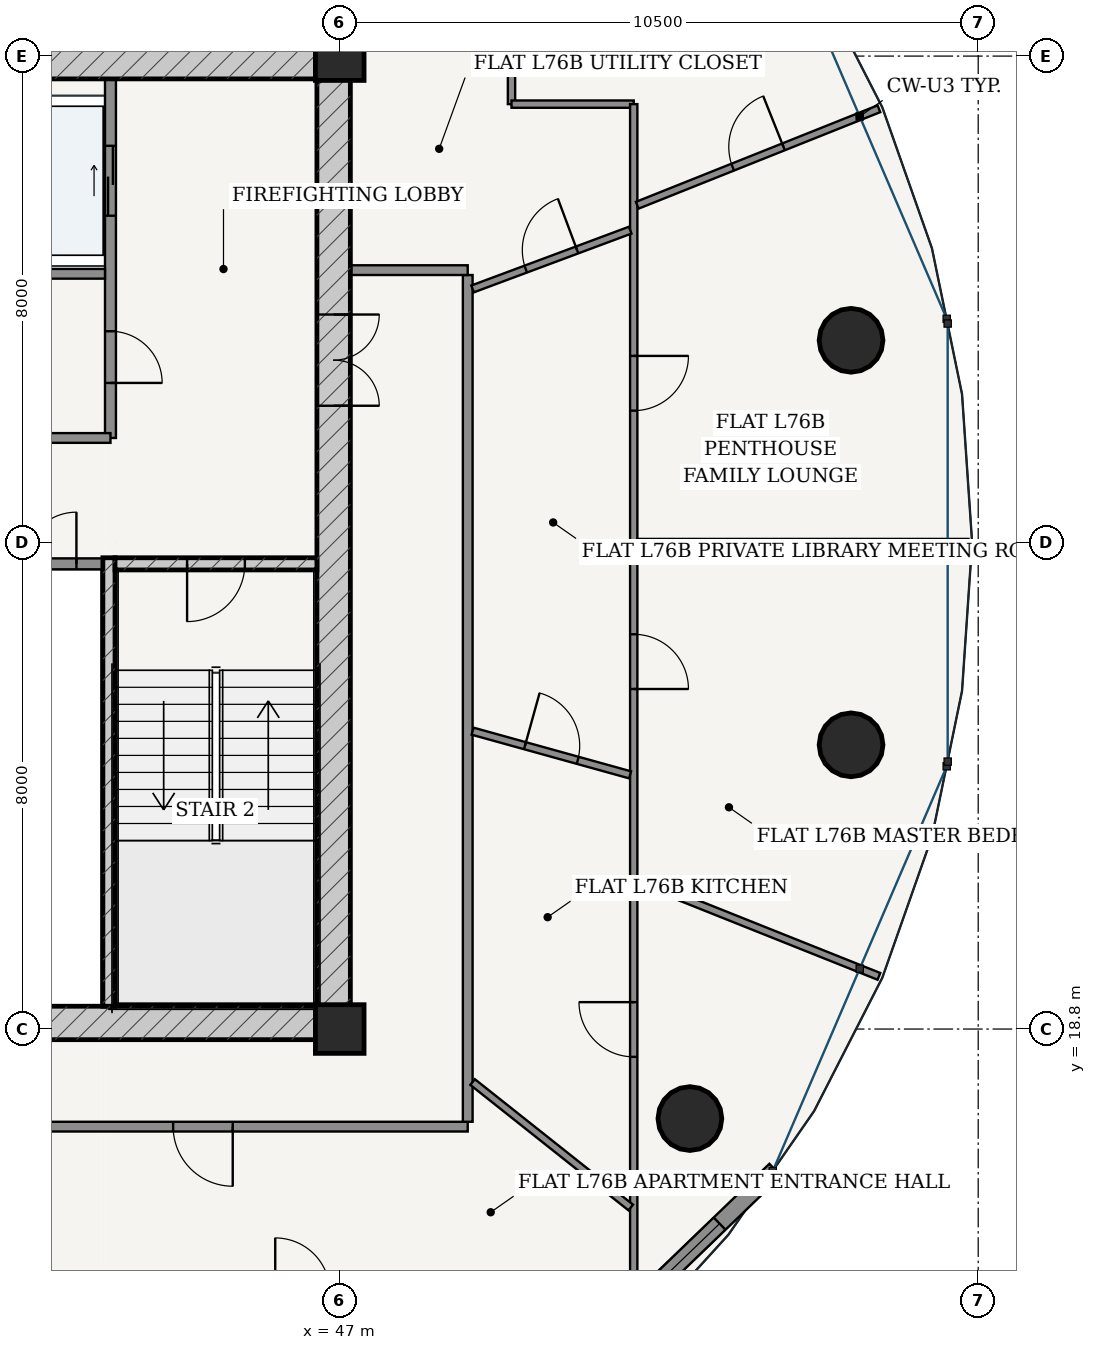
"""IFC4 building model, lengths in metres.
Left out: names, types, materials, properties, quantities, classifications, styles, units other than length and angle.
Written with IfcOpenShell. Run it as: python <this file> out.ifc"""

import sys

from ifc_helpers import new_model, si_unit, direction, frame, frame_2d, origin, origin_2d, place, context, subcontext, project, spatial, rectangle, hollow_circle, extrude, source, transform, mapped, element, fill, save


model = new_model("IFC4")
c1 = context("Model", 3, precision=1e-05, world=origin(), true_north=direction((-0.2419218956, 0.970295726276)))
c2 = subcontext(c1, "Body", "Model", "MODEL_VIEW")
j1 = project(units=[si_unit("LENGTHUNIT", "METRE"), si_unit("PLANEANGLEUNIT", "RADIAN")], contexts=[c1])
p1 = place(None, origin())
s1 = spatial("IfcSite", under=j1, at=p1, CompositionType="ELEMENT")
p2 = place(p1, origin())
s2 = spatial("IfcBuilding", under=s1, at=p2, CompositionType="ELEMENT")
p3 = place(p2, frame((0.0, 0.0, 289.45)))
s3 = spatial("IfcBuildingStorey", under=s2, at=p3, CompositionType="ELEMENT", Elevation=289.45)
for number, where, z_axis, x_axis in (
    (1, (47.0, 18.8, 0.0), (0.0, 0.0, 1.0), (1.0, 0.0, 0.0)),
    (2, (47.0, 34.8, 0.0), (0.0, 0.0, 1.0), (1.0, 0.0, 0.0)),
):
    element("IfcColumn", number, at=place(p3, frame(where, z_axis=z_axis, x_axis=x_axis)), inside=s3, PredefinedType="COLUMN", context=c2, shape_type="SweptSolid", body=[
        extrude(rectangle(XDim=0.8, YDim=0.8, at=origin_2d()), origin(), (0.0, 0.0, 1.0), 3.75),
    ])
p4 = place(p3, frame((28.825, 18.9, 0.0), z_axis=(0.0, 0.0, 1.0), x_axis=(1.0, 0.0, 0.0)))
e3 = element("IfcWall", 3, at=p4, inside=s3, PredefinedType="SHEAR", context=c2, shape_type="SweptSolid", body=[
    extrude(rectangle(XDim=18.35, YDim=0.55, at=frame_2d((9.175, 0.0))), origin(), (0.0, 0.0, 1.0), 3.49),
])
p5 = place(p4, frame((7.41, 0.0, 0.0)))
e4 = element("IfcOpeningElement", 4, at=p5, cuts=e3, PredefinedType="OPENING", context=c2, shape_type="SweptSolid", body=[
    extrude(rectangle(XDim=0.85, YDim=2.1, at=frame_2d((0.425, 1.05))), frame((0.0, 0.285, 0.0), z_axis=(0.0, -1.0, 0.0), x_axis=(1.0, 0.0, 0.0)), (0.0, 0.0, 1.0), 0.57),
])
p6 = place(p4, frame((10.49, 0.0, 0.0)))
e5 = element("IfcOpeningElement", 5, at=p6, cuts=e3, PredefinedType="OPENING", context=c2, shape_type="SweptSolid", body=[
    extrude(rectangle(XDim=0.85, YDim=2.1, at=frame_2d((0.425, 1.05))), frame((0.0, 0.285, 0.0), z_axis=(0.0, -1.0, 0.0), x_axis=(1.0, 0.0, 0.0)), (0.0, 0.0, 1.0), 0.57),
])
p7 = place(p3, frame((28.825, 34.7, 0.0), z_axis=(0.0, 0.0, 1.0), x_axis=(1.0, 0.0, 0.0)))
e6 = element("IfcWall", 6, at=p7, inside=s3, PredefinedType="SHEAR", context=c2, shape_type="SweptSolid", body=[
    extrude(rectangle(XDim=18.35, YDim=0.55, at=frame_2d((9.175, 0.0))), origin(), (0.0, 0.0, 1.0), 3.49),
])
p8 = place(p3, frame((46.9, 19.175, 0.0), z_axis=(0.0, 0.0, 1.0), x_axis=(0.0, 1.0, 0.0)))
e7 = element("IfcWall", 7, at=p8, inside=s3, PredefinedType="SHEAR", context=c2, shape_type="SweptSolid", body=[
    extrude(rectangle(XDim=15.25, YDim=0.55, at=frame_2d((7.625, 0.0))), origin(), (0.0, 0.0, 1.0), 3.49),
])
p9 = place(p8, frame((9.875, 0.0, 0.0)))
e8 = element("IfcOpeningElement", 8, at=p9, cuts=e7, PredefinedType="OPENING", context=c2, shape_type="SweptSolid", body=[
    extrude(rectangle(XDim=1.5, YDim=2.2, at=frame_2d((0.75, 1.1))), frame((0.0, 0.285, 0.0), z_axis=(0.0, -1.0, 0.0), x_axis=(1.0, 0.0, 0.0)), (0.0, 0.0, 1.0), 0.57),
])
p10 = place(p3, frame((43.205, 19.175, 0.0), z_axis=(0.0, 0.0, 1.0), x_axis=(0.0, 1.0, 0.0)))
e9 = element("IfcWall", 9, at=p10, inside=s3, PredefinedType="SOLIDWALL", context=c2, shape_type="SweptSolid", body=[
    extrude(rectangle(XDim=7.375, YDim=0.2, at=frame_2d((3.688, 0.0))), origin(), (0.0, 0.0, 1.0), 3.49),
])
p11 = place(p3, frame((43.305, 26.45, 0.0), z_axis=(0.0, 0.0, 1.0), x_axis=(1.0, 0.0, 0.0)))
e10 = element("IfcWall", 10, at=p11, inside=s3, PredefinedType="SOLIDWALL", context=c2, shape_type="SweptSolid", body=[
    extrude(rectangle(XDim=3.32, YDim=0.2, at=frame_2d((1.66, 0.0))), origin(), (0.0, 0.0, 1.0), 3.49),
])
p12 = place(p11, frame((1.185, 0.0, 0.0)))
e11 = element("IfcOpeningElement", 11, at=p12, cuts=e10, PredefinedType="OPENING", context=c2, shape_type="SweptSolid", body=[
    extrude(rectangle(XDim=0.95, YDim=2.15, at=frame_2d((0.475, 1.075))), frame((0.0, 0.11, 0.0), z_axis=(0.0, -1.0, 0.0), x_axis=(1.0, 0.0, 0.0)), (0.0, 0.0, 1.0), 0.22),
])
for number, where, z_axis, x_axis in (
    (12, (55.409, 30.126, 0.0), (0.0, 0.0, 1.0), (1.0, 0.0, 0.0)),
    (13, (52.759, 17.328, 0.0), (0.0, 0.0, 1.0), (1.0, 0.0, 0.0)),
    (14, (55.409, 23.474, 0.0), (0.0, 0.0, 1.0), (1.0, 0.0, 0.0)),
):
    element("IfcColumn", number, at=place(p3, frame(where, z_axis=z_axis, x_axis=x_axis)), inside=s3, PredefinedType="COLUMN", context=c2, shape_type="SweptSolid", body=[
        extrude(hollow_circle(Radius=0.525, WallThickness=0.035, at=origin_2d()), origin(), (0.0, 0.0, 1.0), 3.75),
    ])
p13 = place(p3, frame((48.704, 11.221, 0.0), z_axis=(0.0, 0.0, 1.0), x_axis=(0.719995397366, 0.69397883813, 0.0)))
e15 = element("IfcWall", 15, at=p13, inside=s3, PredefinedType="SOLIDWALL", context=c2, shape_type="SweptSolid", body=[
    extrude(rectangle(XDim=7.582, YDim=0.28, at=frame_2d((3.791, 0.0))), origin(), (0.0, 0.0, 1.0), 3.49),
])
p14 = place(p13, frame((1.272, 0.0, 0.85)))
e16 = element("IfcOpeningElement", 16, at=p14, cuts=e15, PredefinedType="OPENING", context=c2, shape_type="SweptSolid", body=[
    extrude(rectangle(XDim=1.55, YDim=1.95, at=frame_2d((0.775, 0.975))), frame((0.0, 0.15, 0.0), z_axis=(0.0, -1.0, 0.0), x_axis=(1.0, 0.0, 0.0)), (0.0, 0.0, 1.0), 0.3),
])
p15 = place(p13, frame((4.76, 0.0, 0.85)))
e17 = element("IfcOpeningElement", 17, at=p15, cuts=e15, PredefinedType="OPENING", context=c2, shape_type="SweptSolid", body=[
    extrude(rectangle(XDim=1.55, YDim=1.95, at=frame_2d((0.775, 0.975))), frame((0.0, 0.15, 0.0), z_axis=(0.0, -1.0, 0.0), x_axis=(1.0, 0.0, 0.0)), (0.0, 0.0, 1.0), 0.3),
])
p16 = place(p3, frame((41.39, 26.45, 0.0), z_axis=(0.0, 0.0, 1.0), x_axis=(1.0, 0.0, 0.0)))
e18 = element("IfcWall", 18, at=p16, inside=s3, PredefinedType="PARTITIONING", context=c2, shape_type="SweptSolid", body=[
    extrude(rectangle(XDim=1.71, YDim=0.18, at=frame_2d((0.855, 0.0))), origin(), (0.0, 0.0, 1.0), 3.49),
])
p17 = place(p16, frame((0.43, 0.0, 0.0)))
e19 = element("IfcOpeningElement", 19, at=p17, cuts=e18, PredefinedType="OPENING", context=c2, shape_type="SweptSolid", body=[
    extrude(rectangle(XDim=0.85, YDim=2.1, at=frame_2d((0.425, 1.05))), frame((0.0, 0.1, 0.0), z_axis=(0.0, -1.0, 0.0), x_axis=(1.0, 0.0, 0.0)), (0.0, 0.0, 1.0), 0.2),
])
p18 = place(p3, frame((43.23, 28.52, 0.0), z_axis=(0.0, 0.0, 1.0), x_axis=(0.0, 1.0, 0.0)))
e20 = element("IfcWall", 20, at=p18, inside=s3, PredefinedType="PARTITIONING", context=c2, shape_type="SweptSolid", body=[
    extrude(rectangle(XDim=5.905, YDim=0.18, at=frame_2d((2.953, 0.0))), origin(), (0.0, 0.0, 1.0), 3.49),
])
p19 = place(p18, frame((0.905, 0.0, 0.0)))
e21 = element("IfcOpeningElement", 21, at=p19, cuts=e20, PredefinedType="OPENING", context=c2, shape_type="SweptSolid", body=[
    extrude(rectangle(XDim=0.85, YDim=2.1, at=frame_2d((0.425, 1.05))), frame((0.0, 0.1, 0.0), z_axis=(0.0, -1.0, 0.0), x_axis=(1.0, 0.0, 0.0)), (0.0, 0.0, 1.0), 0.2),
])
p20 = place(p18, frame((3.655, 0.0, 0.0)))
e22 = element("IfcOpeningElement", 22, at=p20, cuts=e20, PredefinedType="OPENING", context=c2, shape_type="SweptSolid", body=[
    extrude(rectangle(XDim=1.15, YDim=2.2, at=frame_2d((0.575, 1.1))), frame((0.0, 0.1, 0.0), z_axis=(0.0, -1.0, 0.0), x_axis=(1.0, 0.0, 0.0)), (0.0, 0.0, 1.0), 0.2),
])
p21 = place(p3, frame((41.39, 31.22, 0.0), z_axis=(0.0, 0.0, 1.0), x_axis=(1.0, 0.0, 0.0)))
e23 = element("IfcWall", 23, at=p21, inside=s3, PredefinedType="PARTITIONING", context=c2, shape_type="SweptSolid", body=[
    extrude(rectangle(XDim=1.75, YDim=0.16, at=frame_2d((0.875, 0.0))), origin(), (0.0, 0.0, 1.0), 3.49),
])
p22 = place(p3, frame((41.39, 28.52, 0.0), z_axis=(0.0, 0.0, 1.0), x_axis=(1.0, 0.0, 0.0)))
e24 = element("IfcWall", 24, at=p22, inside=s3, PredefinedType="PARTITIONING", context=c2, shape_type="SweptSolid", body=[
    extrude(rectangle(XDim=1.84, YDim=0.16, at=frame_2d((0.92, 0.0))), origin(), (0.0, 0.0, 1.0), 3.49),
])
p23 = place(p3, frame((26.895, 17.195, 0.0), z_axis=(0.0, 0.0, 1.0), x_axis=(1.0, 0.0, 0.0)))
e25 = element("IfcWall", 25, at=p23, inside=s3, PredefinedType="PARTITIONING", context=c2, shape_type="SweptSolid", body=[
    extrude(rectangle(XDim=22.21, YDim=0.16, at=frame_2d((11.105, 0.0))), origin(), (0.0, 0.0, 1.0), 3.015),
])
p24 = place(p23, frame((17.365, 0.0, 0.0)))
e26 = element("IfcOpeningElement", 26, at=p24, cuts=e25, PredefinedType="OPENING", context=c2, shape_type="SweptSolid", body=[
    extrude(rectangle(XDim=0.98, YDim=2.2, at=frame_2d((0.49, 1.1))), frame((0.0, 0.09, 0.0), z_axis=(0.0, -1.0, 0.0), x_axis=(1.0, 0.0, 0.0)), (0.0, 0.0, 1.0), 0.18),
])
p25 = place(p3, frame((49.105, 17.275, 0.0), z_axis=(0.0, 0.0, 1.0), x_axis=(0.0, 1.0, 0.0)))
e27 = element("IfcWall", 27, at=p25, inside=s3, PredefinedType="PARTITIONING", context=c2, shape_type="SweptSolid", body=[
    extrude(rectangle(XDim=13.925, YDim=0.16, at=frame_2d((6.962, 0.0))), origin(), (0.0, 0.0, 1.0), 3.015),
])
p26 = place(p3, frame((47.175, 31.28, 0.0), z_axis=(0.0, 0.0, 1.0), x_axis=(1.0, 0.0, 0.0)))
e28 = element("IfcWall", 28, at=p26, inside=s3, PredefinedType="PARTITIONING", context=c2, shape_type="SweptSolid", body=[
    extrude(rectangle(XDim=1.93, YDim=0.16, at=frame_2d((0.965, 0.0))), origin(), (0.0, 0.0, 1.0), 3.49),
])
p27 = place(p3, frame((49.825, 37.625, 0.0), z_axis=(0.0, 0.0, 1.0), x_axis=(0.0, -1.0, 0.0)))
e29 = element("IfcWall", 29, at=p27, inside=s3, PredefinedType="PARTITIONING", context=c2, shape_type="SweptSolid", body=[
    extrude(rectangle(XDim=3.615, YDim=0.12, at=frame_2d((1.808, 0.0))), origin(), (0.0, 0.0, 1.0), 3.015),
])
p28 = place(p3, frame((49.825, 34.01, 0.0), z_axis=(0.0, 0.0, 1.0), x_axis=(1.0, 0.0, 0.0)))
e30 = element("IfcWall", 30, at=p28, inside=s3, PredefinedType="PARTITIONING", context=c2, shape_type="SweptSolid", body=[
    extrude(rectangle(XDim=2.01, YDim=0.12, at=frame_2d((1.005, 0.0))), origin(), (0.0, 0.0, 1.0), 3.209),
])
p29 = place(p3, frame((51.835, 34.01, 0.0), z_axis=(0.0, 0.0, 1.0), x_axis=(0.0, -1.0, 0.0)))
e31 = element("IfcWall", 31, at=p29, inside=s3, PredefinedType="PARTITIONING", context=c2, shape_type="SweptSolid", body=[
    extrude(rectangle(XDim=19.545, YDim=0.12, at=frame_2d((9.772, 0.0))), origin(), (0.0, 0.0, 1.0), 3.015),
])
p30 = place(p29, frame((14.768, 0.0, 0.0)))
e32 = element("IfcOpeningElement", 32, at=p30, cuts=e31, PredefinedType="OPENING", context=c2, shape_type="SweptSolid", body=[
    extrude(rectangle(XDim=0.9, YDim=2.15, at=frame_2d((0.45, 1.075))), frame((0.0, 0.07, 0.0), z_axis=(0.0, -1.0, 0.0), x_axis=(1.0, 0.0, 0.0)), (0.0, 0.0, 1.0), 0.14),
])
p31 = place(p29, frame((8.718, 0.0, 0.0)))
e33 = element("IfcOpeningElement", 33, at=p31, cuts=e31, PredefinedType="OPENING", context=c2, shape_type="SweptSolid", body=[
    extrude(rectangle(XDim=0.9, YDim=2.15, at=frame_2d((0.45, 1.075))), frame((0.0, 0.07, 0.0), z_axis=(0.0, -1.0, 0.0), x_axis=(1.0, 0.0, 0.0)), (0.0, 0.0, 1.0), 0.14),
])
p32 = place(p29, frame((4.14, 0.0, 0.0)))
e34 = element("IfcOpeningElement", 34, at=p32, cuts=e31, PredefinedType="OPENING", context=c2, shape_type="SweptSolid", body=[
    extrude(rectangle(XDim=0.9, YDim=2.15, at=frame_2d((0.45, 1.075))), frame((0.0, 0.07, 0.0), z_axis=(0.0, -1.0, 0.0), x_axis=(1.0, 0.0, 0.0)), (0.0, 0.0, 1.0), 0.14),
])
p33 = place(p3, frame((51.893, 21.253, 0.0), z_axis=(0.0, 0.0, 1.0), x_axis=(0.928712556691, -0.370800467966, 0.0)))
e35 = element("IfcWall", 35, at=p33, inside=s3, PredefinedType="PARTITIONING", context=c2, shape_type="SweptSolid", body=[
    extrude(rectangle(XDim=4.28, YDim=0.12, at=frame_2d((2.14, 0.0))), origin(), (0.0, 0.0, 1.0), 3.121),
])
p34 = place(p3, frame((51.897, 26.8, 0.0), z_axis=(0.0, 0.0, 1.0), x_axis=(1.0, 0.0, 0.0)))
e36 = element("IfcWall", 36, at=p34, inside=s3, PredefinedType="PARTITIONING", context=c2, shape_type="SweptSolid", body=[
    extrude(rectangle(XDim=5.443, YDim=0.12, at=frame_2d((2.722, 0.0))), origin(), (0.0, 0.0, 1.0), 3.121),
])
p35 = place(p3, frame((51.893, 32.347, 0.0), z_axis=(0.0, 0.0, 1.0), x_axis=(0.928712556691, 0.370800467966, 0.0)))
e37 = element("IfcWall", 37, at=p35, inside=s3, PredefinedType="PARTITIONING", context=c2, shape_type="SweptSolid", body=[
    extrude(rectangle(XDim=4.28, YDim=0.12, at=frame_2d((2.14, 0.0))), origin(), (0.0, 0.0, 1.0), 3.121),
])
p36 = place(p35, frame((1.69, 0.0, 0.0)))
e38 = element("IfcOpeningElement", 38, at=p36, cuts=e37, PredefinedType="OPENING", context=c2, shape_type="SweptSolid", body=[
    extrude(rectangle(XDim=0.9, YDim=2.15, at=frame_2d((0.45, 1.075))), frame((0.0, 0.07, 0.0), z_axis=(0.0, -1.0, 0.0), x_axis=(1.0, 0.0, 0.0)), (0.0, 0.0, 1.0), 0.14),
])
p37 = place(p3, frame((49.185, 17.928, 0.0), z_axis=(0.0, 0.0, 1.0), x_axis=(0.78348039615, -0.621416501912, 0.0)))
e39 = element("IfcWall", 39, at=p37, inside=s3, PredefinedType="PARTITIONING", context=c2, shape_type="SweptSolid", body=[
    extrude(rectangle(XDim=3.32, YDim=0.12, at=frame_2d((1.66, 0.0))), origin(), (0.0, 0.0, 1.0), 3.121),
])
p38 = place(p3, frame((49.185, 23.698, 0.0), z_axis=(0.0, 0.0, 1.0), x_axis=(0.963633636359, -0.267226897744, 0.0)))
e40 = element("IfcWall", 40, at=p38, inside=s3, PredefinedType="PARTITIONING", context=c2, shape_type="SweptSolid", body=[
    extrude(rectangle(XDim=2.688, YDim=0.12, at=frame_2d((1.344, 0.0))), origin(), (0.0, 0.0, 1.0), 3.209),
])
p39 = place(p38, frame((0.894, 0.0, 0.0)))
e41 = element("IfcOpeningElement", 41, at=p39, cuts=e40, PredefinedType="OPENING", context=c2, shape_type="SweptSolid", body=[
    extrude(rectangle(XDim=0.9, YDim=2.15, at=frame_2d((0.45, 1.075))), frame((0.0, 0.07, 0.0), z_axis=(0.0, -1.0, 0.0), x_axis=(1.0, 0.0, 0.0)), (0.0, 0.0, 1.0), 0.14),
])
p40 = place(p3, frame((49.185, 30.971, 0.0), z_axis=(0.0, 0.0, 1.0), x_axis=(0.93696600231, 0.349420535338, 0.0)))
e42 = element("IfcWall", 42, at=p40, inside=s3, PredefinedType="PARTITIONING", context=c2, shape_type="SweptSolid", body=[
    extrude(rectangle(XDim=2.766, YDim=0.12, at=frame_2d((1.383, 0.0))), origin(), (0.0, 0.0, 1.0), 3.209),
])
p41 = place(p40, frame((0.933, 0.0, 0.0)))
e43 = element("IfcOpeningElement", 43, at=p41, cuts=e42, PredefinedType="OPENING", context=c2, shape_type="SweptSolid", body=[
    extrude(rectangle(XDim=0.9, YDim=2.15, at=frame_2d((0.45, 1.075))), frame((0.0, 0.07, 0.0), z_axis=(0.0, -1.0, 0.0), x_axis=(1.0, 0.0, 0.0)), (0.0, 0.0, 1.0), 0.14),
])
m1 = source(origin(), c2, "Body", "SweptSolid", [
    extrude(rectangle(XDim=1.55, YDim=1.95, at=frame_2d((0.775, 0.975))), frame((0.0, 0.03, 0.0), z_axis=(0.0, -1.0, 0.0), x_axis=(1.0, 0.0, 0.0)), (0.0, 0.0, 1.0), 0.06),
])
p42 = place(p15, origin())
e44 = element("IfcWindow", 44, at=p42, inside=s3, PartitioningType="SINGLE_PANEL", PredefinedType="WINDOW", context=c2, shape_type="MappedRepresentation", body=[
    mapped(m1, transform((0.0, 0.0, 0.0), scale=1.0)),
])
fill(e17, e44)
m2 = source(origin(), c2, "Body", "SweptSolid", [
    extrude(rectangle(XDim=1.5, YDim=2.2, at=frame_2d((0.75, 1.1))), frame((0.0, 0.025, 0.0), z_axis=(0.0, -1.0, 0.0), x_axis=(1.0, 0.0, 0.0)), (0.0, 0.0, 1.0), 0.05),
])
p43 = place(p9, frame((1.5, 0.0, 0.0), z_axis=(0.0, 0.0, 1.0), x_axis=(-1.0, 0.0, 0.0)))
e45 = element("IfcDoor", 45, at=p43, inside=s3, OperationType="DOUBLE_DOOR_SINGLE_SWING", PredefinedType="DOOR", context=c2, shape_type="MappedRepresentation", body=[
    mapped(m2, transform((0.0, 0.0, 0.0), scale=1.0)),
])
fill(e8, e45)
m3 = source(origin(), c2, "Body", "SweptSolid", [
    extrude(rectangle(XDim=0.95, YDim=2.15, at=frame_2d((0.475, 1.075))), frame((0.0, 0.025, 0.0), z_axis=(0.0, -1.0, 0.0), x_axis=(1.0, 0.0, 0.0)), (0.0, 0.0, 1.0), 0.05),
])
p44 = place(p12, frame((0.95, 0.0, 0.0), z_axis=(0.0, 0.0, 1.0), x_axis=(-1.0, 0.0, 0.0)))
e46 = element("IfcDoor", 46, at=p44, inside=s3, OperationType="SINGLE_SWING_RIGHT", PredefinedType="DOOR", context=c2, shape_type="MappedRepresentation", body=[
    mapped(m3, transform((0.0, 0.0, 0.0), scale=1.0)),
])
fill(e11, e46)
m4 = source(origin(), c2, "Body", "SweptSolid", [
    extrude(rectangle(XDim=0.85, YDim=2.1, at=frame_2d((0.425, 1.05))), frame((0.0, 0.025, 0.0), z_axis=(0.0, -1.0, 0.0), x_axis=(1.0, 0.0, 0.0)), (0.0, 0.0, 1.0), 0.05),
])
p45 = place(p17, origin())
e47 = element("IfcDoor", 47, at=p45, inside=s3, OperationType="SINGLE_SWING_RIGHT", PredefinedType="DOOR", context=c2, shape_type="MappedRepresentation", body=[
    mapped(m4, transform((0.0, 0.0, 0.0), scale=1.0)),
])
fill(e19, e47)
p46 = place(p19, frame((0.85, 0.0, 0.0), z_axis=(0.0, 0.0, 1.0), x_axis=(-1.0, 0.0, 0.0)))
e48 = element("IfcDoor", 48, at=p46, inside=s3, OperationType="SINGLE_SWING_RIGHT", PredefinedType="DOOR", context=c2, shape_type="MappedRepresentation", body=[
    mapped(m4, transform((0.0, 0.0, 0.0), scale=1.0)),
])
fill(e21, e48)
m5 = source(origin(), c2, "Body", "SweptSolid", [
    extrude(rectangle(XDim=1.15, YDim=2.2, at=frame_2d((0.575, 1.1))), frame((0.0, 0.025, 0.0), z_axis=(0.0, -1.0, 0.0), x_axis=(1.0, 0.0, 0.0)), (0.0, 0.0, 1.0), 0.05),
])
p47 = place(p20, origin())
e49 = element("IfcDoor", 49, at=p47, inside=s3, OperationType="DOUBLE_DOOR_SLIDING", PredefinedType="DOOR", context=c2, shape_type="MappedRepresentation", body=[
    mapped(m5, transform((0.0, 0.0, 0.0), scale=1.0)),
])
fill(e22, e49)
m6 = source(origin(), c2, "Body", "SweptSolid", [
    extrude(rectangle(XDim=0.98, YDim=2.2, at=frame_2d((0.49, 1.1))), frame((0.0, 0.025, 0.0), z_axis=(0.0, -1.0, 0.0), x_axis=(1.0, 0.0, 0.0)), (0.0, 0.0, 1.0), 0.05),
])
p48 = place(p24, frame((0.98, 0.0, 0.0), z_axis=(0.0, 0.0, 1.0), x_axis=(-1.0, 0.0, 0.0)))
e50 = element("IfcDoor", 50, at=p48, inside=s3, OperationType="SINGLE_SWING_LEFT", PredefinedType="DOOR", context=c2, shape_type="MappedRepresentation", body=[
    mapped(m6, transform((0.0, 0.0, 0.0), scale=1.0)),
])
fill(e26, e50)
m7 = source(origin(), c2, "Body", "SweptSolid", [
    extrude(rectangle(XDim=0.9, YDim=2.15, at=frame_2d((0.45, 1.075))), frame((0.0, 0.025, 0.0), z_axis=(0.0, -1.0, 0.0), x_axis=(1.0, 0.0, 0.0)), (0.0, 0.0, 1.0), 0.05),
])
p49 = place(p30, frame((0.9, 0.0, 0.0), z_axis=(0.0, 0.0, 1.0), x_axis=(-1.0, 0.0, 0.0)))
e51 = element("IfcDoor", 51, at=p49, inside=s3, OperationType="SINGLE_SWING_RIGHT", PredefinedType="DOOR", context=c2, shape_type="MappedRepresentation", body=[
    mapped(m7, transform((0.0, 0.0, 0.0), scale=1.0)),
])
fill(e32, e51)
p50 = place(p39, origin())
e52 = element("IfcDoor", 52, at=p50, inside=s3, OperationType="SINGLE_SWING_LEFT", PredefinedType="DOOR", context=c2, shape_type="MappedRepresentation", body=[
    mapped(m7, transform((0.0, 0.0, 0.0), scale=1.0)),
])
fill(e41, e52)
p51 = place(p41, origin())
e53 = element("IfcDoor", 53, at=p51, inside=s3, OperationType="SINGLE_SWING_RIGHT", PredefinedType="DOOR", context=c2, shape_type="MappedRepresentation", body=[
    mapped(m7, transform((0.0, 0.0, 0.0), scale=1.0)),
])
fill(e43, e53)
p52 = place(p31, origin())
e54 = element("IfcDoor", 54, at=p52, inside=s3, OperationType="SINGLE_SWING_RIGHT", PredefinedType="DOOR", context=c2, shape_type="MappedRepresentation", body=[
    mapped(m7, transform((0.0, 0.0, 0.0), scale=1.0)),
])
fill(e33, e54)
p53 = place(p32, origin())
e55 = element("IfcDoor", 55, at=p53, inside=s3, OperationType="SINGLE_SWING_LEFT", PredefinedType="DOOR", context=c2, shape_type="MappedRepresentation", body=[
    mapped(m7, transform((0.0, 0.0, 0.0), scale=1.0)),
])
fill(e34, e55)
p54 = place(p36, origin())
e56 = element("IfcDoor", 56, at=p54, inside=s3, OperationType="SINGLE_SWING_RIGHT", PredefinedType="DOOR", context=c2, shape_type="MappedRepresentation", body=[
    mapped(m7, transform((0.0, 0.0, 0.0), scale=1.0)),
])
fill(e38, e56)
save(model, sys.argv[1])
